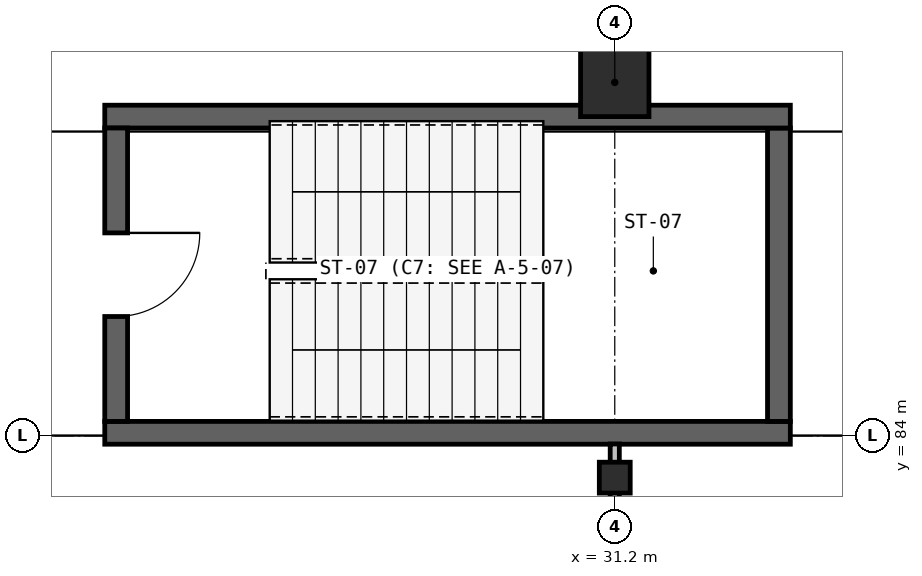
"""IFC4 building model, lengths in metres.
Left out: names, types, materials, properties, quantities, classifications, styles, units other than length and angle.
Written with IfcOpenShell. Run it as: python <this file> out.ifc"""

import sys

from ifc_helpers import new_model, si_unit, direction, frame, frame_2d, origin, origin_2d, place, context, subcontext, project, spatial, rectangle, hollow_circle, extrude, element, fill, save


model = new_model("IFC4")
c1 = context("Model", 3, precision=1e-05, world=origin(), true_north=direction((0.0, 1.0)))
c2 = subcontext(c1, "Body", "Model", "MODEL_VIEW")
j1 = project(units=[si_unit("LENGTHUNIT", "METRE"), si_unit("PLANEANGLEUNIT", "RADIAN")], contexts=[c1])
p1 = place(None, origin())
s1 = spatial("IfcSite", under=j1, at=p1, CompositionType="ELEMENT")
p2 = place(p1, origin())
s2 = spatial("IfcBuilding", under=s1, at=p2, CompositionType="ELEMENT")
p3 = place(p2, frame((0.0, 0.0, -4.8)))
s3 = spatial("IfcBuildingStorey", under=s2, at=p3, CompositionType="ELEMENT", Elevation=-4.8)
p4 = place(p3, frame((31.2, 83.45, 0.0), z_axis=(0.0, 0.0, 1.0), x_axis=(1.0, 0.0, 0.0)))
e1 = element("IfcColumn", 1, at=p4, inside=s3, PredefinedType="COLUMN", context=c2, shape_type="SweptSolid", body=[
    extrude(hollow_circle(Radius=0.203, WallThickness=0.016, at=origin_2d()), origin(), (0.0, 0.0, 1.0), 4.8),
])
p5 = place(p3, frame((31.2, 88.65, 0.0), z_axis=(0.0, 0.0, 1.0), x_axis=(1.0, 0.0, 0.0)))
e2 = element("IfcColumn", 2, at=p5, inside=s3, PredefinedType="COLUMN", context=c2, shape_type="SweptSolid", body=[
    extrude(rectangle(XDim=0.9, YDim=0.9, at=origin_2d()), origin(), (0.0, 0.0, 1.0), 4.8),
])
p6 = place(p3, frame((24.49, 84.04, 0.0), z_axis=(0.0, 0.0, 1.0), x_axis=(1.0, 0.0, 0.0)))
e3 = element("IfcWall", 3, at=p6, inside=s3, PredefinedType="SHEAR", context=c2, shape_type="SweptSolid", body=[
    extrude(rectangle(XDim=9.02, YDim=0.3, at=frame_2d((4.51, 0.0))), origin(), (0.0, 0.0, 1.0), 4.45),
])
p7 = place(p3, frame((33.36, 84.19, 0.0), z_axis=(0.0, 0.0, 1.0), x_axis=(0.0, 1.0, 0.0)))
e4 = element("IfcWall", 4, at=p7, inside=s3, PredefinedType="SHEAR", context=c2, shape_type="SweptSolid", body=[
    extrude(rectangle(XDim=3.86, YDim=0.3, at=frame_2d((1.93, 0.0))), origin(), (0.0, 0.0, 1.0), 4.45),
])
p8 = place(p3, frame((33.51, 88.2, 0.0), z_axis=(0.0, 0.0, 1.0), x_axis=(-1.0, 0.0, 0.0)))
e5 = element("IfcWall", 5, at=p8, inside=s3, PredefinedType="SHEAR", context=c2, shape_type="SweptSolid", body=[
    extrude(rectangle(XDim=9.02, YDim=0.3, at=frame_2d((4.51, 0.0))), origin(), (0.0, 0.0, 1.0), 4.45),
])
p9 = place(p3, frame((24.64, 88.05, 0.0), z_axis=(0.0, 0.0, 1.0), x_axis=(0.0, -1.0, 0.0)))
e6 = element("IfcWall", 6, at=p9, inside=s3, PredefinedType="SHEAR", context=c2, shape_type="SweptSolid", body=[
    extrude(rectangle(XDim=3.86, YDim=0.3, at=frame_2d((1.93, 0.0))), origin(), (0.0, 0.0, 1.0), 4.45),
])
p10 = place(p9, frame((1.38, 0.0, 0.0)))
e7 = element("IfcOpeningElement", 7, at=p10, cuts=e6, PredefinedType="OPENING", context=c2, shape_type="SweptSolid", body=[
    extrude(rectangle(XDim=1.1, YDim=2.15, at=frame_2d((0.55, 1.075))), frame((0.0, 0.16, 0.0), z_axis=(0.0, -1.0, 0.0), x_axis=(1.0, 0.0, 0.0)), (0.0, 0.0, 1.0), 0.32),
])
p11 = place(p3, frame((31.2, 83.893, 0.0), z_axis=(0.0, 0.0, 1.0), x_axis=(0.0, -1.0, 0.0)))
e8 = element("IfcWall", 8, at=p11, inside=s3, PredefinedType="PARTITIONING", context=c2, shape_type="SweptSolid", body=[
    extrude(rectangle(XDim=4.333, YDim=0.12, at=frame_2d((2.167, 0.0))), origin(), (0.0, 0.0, 1.0), 3.7),
])
p12 = place(p10, origin())
e9 = element("IfcDoor", 9, at=p12, inside=s3, OperationType="SINGLE_SWING_RIGHT", PredefinedType="DOOR", context=c2, shape_type="SweptSolid", body=[
    extrude(rectangle(XDim=1.1, YDim=2.15, at=frame_2d((0.55, 1.075))), frame((0.0, 0.025, 0.0), z_axis=(0.0, -1.0, 0.0), x_axis=(1.0, 0.0, 0.0)), (0.0, 0.0, 1.0), 0.05),
])
fill(e7, e9)
save(model, sys.argv[1])
